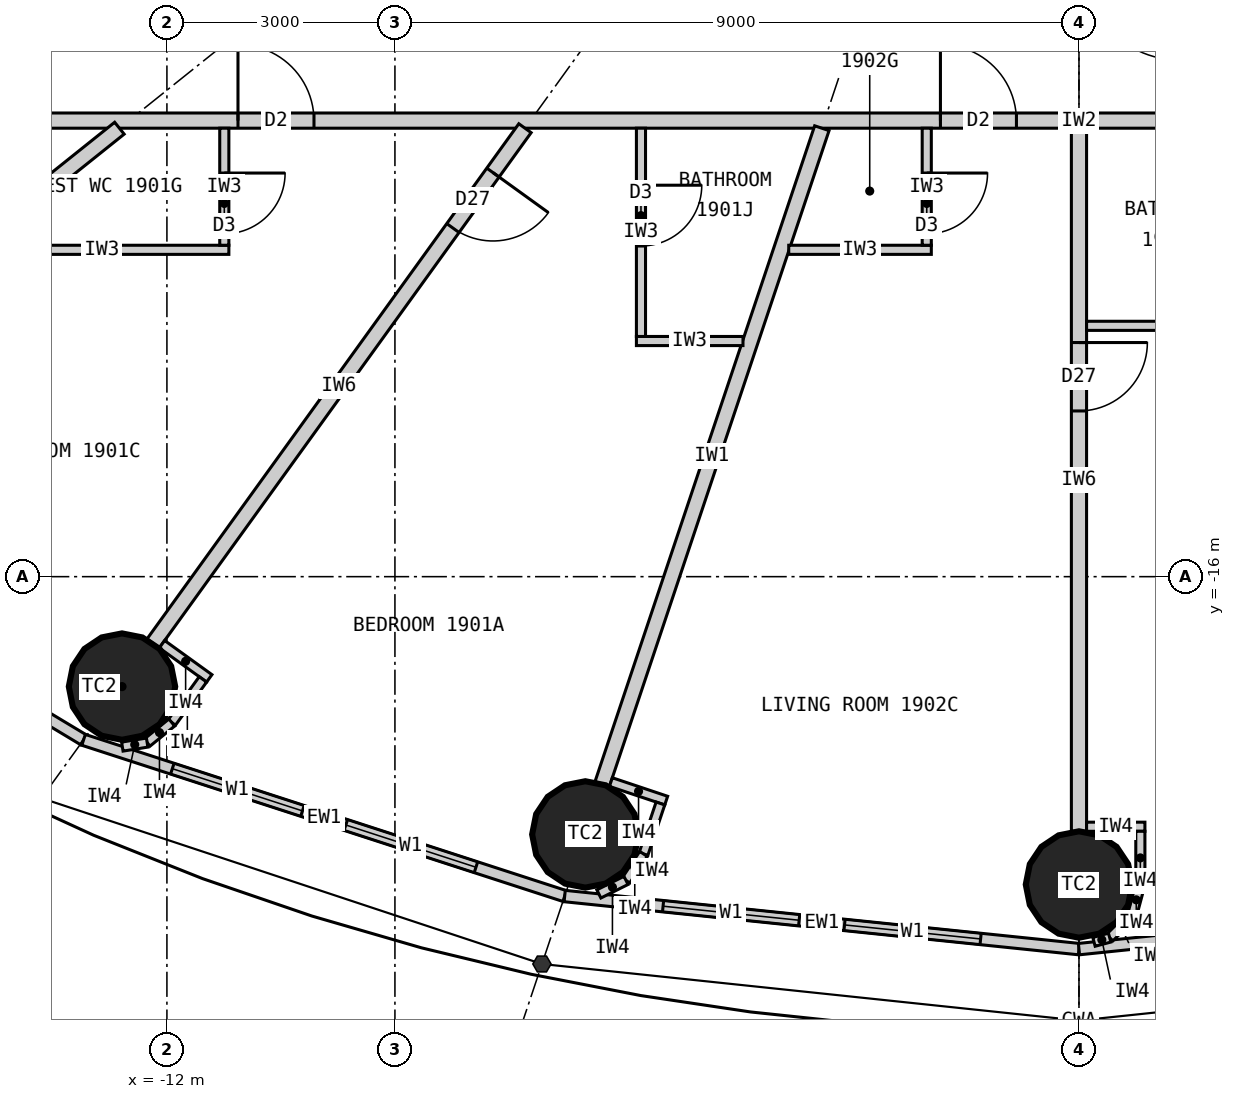
"""IFC4 building model, lengths in metres.
Left out: names, types, materials, properties, quantities, classifications, styles, units other than length and angle.
Written with IfcOpenShell. Run it as: python <this file> out.ifc"""

import sys

from ifc_helpers import new_model, si_unit, direction, frame, frame_2d, origin, origin_2d, place, context, subcontext, project, spatial, rectangle, circle, extrude, element, fill, save


model = new_model("IFC4")
c1 = context("Model", 3, precision=1e-05, world=origin(), true_north=direction((0.0, 1.0)))
c2 = subcontext(c1, "Body", "Model", "MODEL_VIEW")
j1 = project(units=[si_unit("LENGTHUNIT", "METRE"), si_unit("PLANEANGLEUNIT", "RADIAN")], contexts=[c1])
p1 = place(None, origin())
s1 = spatial("IfcSite", under=j1, at=p1, CompositionType="ELEMENT")
p2 = place(p1, origin())
s2 = spatial("IfcBuilding", under=s1, at=p2, CompositionType="ELEMENT")
p3 = place(p2, frame((0.0, 0.0, 77.1)))
s3 = spatial("IfcBuildingStorey", under=s2, at=p3, CompositionType="ELEMENT", Elevation=77.1)
for number, where, z_axis, x_axis in (
    (1, (-12.591, -17.447, 0.0), (0.0, 0.0, 1.0), (1.0, 0.0, 0.0)),
    (2, (-6.495, -19.391, 0.0), (0.0, 0.0, 1.0), (1.0, 0.0, 0.0)),
    (3, (0.0, -20.05, 0.0), (0.0, 0.0, 1.0), (1.0, 0.0, 0.0)),
):
    element("IfcColumn", number, at=place(p3, frame(where, z_axis=z_axis, x_axis=x_axis)), inside=s3, PredefinedType="COLUMN", context=c2, shape_type="SweptSolid", body=[
        extrude(circle(Radius=0.7, at=origin_2d()), origin(), (0.0, 0.0, 1.0), 3.3),
    ])
p4 = place(p3, frame((-18.57, -14.856, 0.0), z_axis=(0.0, 0.0, 1.0), x_axis=(0.856983180864, -0.515344377787, 0.0)))
e4 = element("IfcWall", 4, at=p4, inside=s3, PredefinedType="ELEMENTEDWALL", context=c2, shape_type="SweptSolid", body=[
    extrude(rectangle(XDim=6.386, YDim=0.15, at=frame_2d((3.193, 0.0))), origin(), (0.0, 0.0, 1.0), 3.12),
])
p5 = place(p4, frame((1.093, 0.0, 0.9)))
e5 = element("IfcOpeningElement", 5, at=p5, cuts=e4, PredefinedType="OPENING", context=c2, shape_type="SweptSolid", body=[
    extrude(rectangle(XDim=1.8, YDim=1.9, at=frame_2d((0.9, 0.95))), frame((0.0, 0.085, 0.0), z_axis=(0.0, -1.0, 0.0), x_axis=(1.0, 0.0, 0.0)), (0.0, 0.0, 1.0), 0.17),
])
p6 = place(p4, frame((3.493, 0.0, 0.9)))
e6 = element("IfcOpeningElement", 6, at=p6, cuts=e4, PredefinedType="OPENING", context=c2, shape_type="SweptSolid", body=[
    extrude(rectangle(XDim=1.8, YDim=1.9, at=frame_2d((0.9, 0.95))), frame((0.0, 0.085, 0.0), z_axis=(0.0, -1.0, 0.0), x_axis=(1.0, 0.0, 0.0)), (0.0, 0.0, 1.0), 0.17),
])
p7 = place(p3, frame((-13.096, -18.147, 0.0), z_axis=(0.0, 0.0, 1.0), x_axis=(0.951137534625, -0.308767534285, 0.0)))
e7 = element("IfcWall", 7, at=p7, inside=s3, PredefinedType="ELEMENTEDWALL", context=c2, shape_type="SweptSolid", body=[
    extrude(rectangle(XDim=6.655, YDim=0.15, at=frame_2d((3.328, 0.0))), origin(), (0.0, 0.0, 1.0), 3.12),
])
p8 = place(p7, frame((1.228, 0.0, 0.9)))
e8 = element("IfcOpeningElement", 8, at=p8, cuts=e7, PredefinedType="OPENING", context=c2, shape_type="SweptSolid", body=[
    extrude(rectangle(XDim=1.8, YDim=1.9, at=frame_2d((0.9, 0.95))), frame((0.0, 0.085, 0.0), z_axis=(0.0, -1.0, 0.0), x_axis=(1.0, 0.0, 0.0)), (0.0, 0.0, 1.0), 0.17),
])
p9 = place(p7, frame((3.628, 0.0, 0.9)))
e9 = element("IfcOpeningElement", 9, at=p9, cuts=e7, PredefinedType="OPENING", context=c2, shape_type="SweptSolid", body=[
    extrude(rectangle(XDim=1.8, YDim=1.9, at=frame_2d((0.9, 0.95))), frame((0.0, 0.085, 0.0), z_axis=(0.0, -1.0, 0.0), x_axis=(1.0, 0.0, 0.0)), (0.0, 0.0, 1.0), 0.17),
])
p10 = place(p3, frame((-6.766, -20.202, 0.0), z_axis=(0.0, 0.0, 1.0), x_axis=(0.994721394369, -0.102612609291, 0.0)))
e10 = element("IfcWall", 10, at=p10, inside=s3, PredefinedType="ELEMENTEDWALL", context=c2, shape_type="SweptSolid", body=[
    extrude(rectangle(XDim=6.802, YDim=0.15, at=frame_2d((3.401, 0.0))), origin(), (0.0, 0.0, 1.0), 3.12),
])
p11 = place(p10, frame((1.301, 0.0, 0.9)))
e11 = element("IfcOpeningElement", 11, at=p11, cuts=e10, PredefinedType="OPENING", context=c2, shape_type="SweptSolid", body=[
    extrude(rectangle(XDim=1.8, YDim=1.9, at=frame_2d((0.9, 0.95))), frame((0.0, 0.085, 0.0), z_axis=(0.0, -1.0, 0.0), x_axis=(1.0, 0.0, 0.0)), (0.0, 0.0, 1.0), 0.17),
])
p12 = place(p10, frame((3.701, 0.0, 0.9)))
e12 = element("IfcOpeningElement", 12, at=p12, cuts=e10, PredefinedType="OPENING", context=c2, shape_type="SweptSolid", body=[
    extrude(rectangle(XDim=1.8, YDim=1.9, at=frame_2d((0.9, 0.95))), frame((0.0, 0.085, 0.0), z_axis=(0.0, -1.0, 0.0), x_axis=(1.0, 0.0, 0.0)), (0.0, 0.0, 1.0), 0.17),
])
p13 = place(p3, frame((0.0, -20.9, 0.0), z_axis=(0.0, 0.0, 1.0), x_axis=(0.994721394369, 0.102612609291, 0.0)))
e13 = element("IfcWall", 13, at=p13, inside=s3, PredefinedType="ELEMENTEDWALL", context=c2, shape_type="SweptSolid", body=[
    extrude(rectangle(XDim=6.802, YDim=0.15, at=frame_2d((3.401, 0.0))), origin(), (0.0, 0.0, 1.0), 3.12),
])
p14 = place(p13, frame((1.301, 0.0, 0.9)))
e14 = element("IfcOpeningElement", 14, at=p14, cuts=e13, PredefinedType="OPENING", context=c2, shape_type="SweptSolid", body=[
    extrude(rectangle(XDim=1.8, YDim=1.9, at=frame_2d((0.9, 0.95))), frame((0.0, 0.085, 0.0), z_axis=(0.0, -1.0, 0.0), x_axis=(1.0, 0.0, 0.0)), (0.0, 0.0, 1.0), 0.17),
])
p15 = place(p13, frame((3.701, 0.0, 0.9)))
e15 = element("IfcOpeningElement", 15, at=p15, cuts=e13, PredefinedType="OPENING", context=c2, shape_type="SweptSolid", body=[
    extrude(rectangle(XDim=1.8, YDim=1.9, at=frame_2d((0.9, 0.95))), frame((0.0, 0.085, 0.0), z_axis=(0.0, -1.0, 0.0), x_axis=(1.0, 0.0, 0.0)), (0.0, 0.0, 1.0), 0.17),
])
p16 = place(p3, frame((14.1, -10.0, 0.0), z_axis=(0.0, 0.0, 1.0), x_axis=(-1.0, 0.0, 0.0)))
e16 = element("IfcWall", 16, at=p16, inside=s3, PredefinedType="PARTITIONING", context=c2, shape_type="SweptSolid", body=[
    extrude(rectangle(XDim=28.2, YDim=0.2, at=frame_2d((14.1, 0.0))), origin(), (0.0, 0.0, 1.0), 3.12),
])
p17 = place(p16, frame((24.165, 0.0, 0.0)))
e17 = element("IfcOpeningElement", 17, at=p17, cuts=e16, PredefinedType="OPENING", context=c2, shape_type="SweptSolid", body=[
    extrude(rectangle(XDim=1.0, YDim=2.2, at=frame_2d((0.5, 1.1))), frame((0.0, 0.11, 0.0), z_axis=(0.0, -1.0, 0.0), x_axis=(1.0, 0.0, 0.0)), (0.0, 0.0, 1.0), 0.22),
])
p18 = place(p16, frame((14.923, 0.0, 0.0)))
e18 = element("IfcOpeningElement", 18, at=p18, cuts=e16, PredefinedType="OPENING", context=c2, shape_type="SweptSolid", body=[
    extrude(rectangle(XDim=1.0, YDim=2.2, at=frame_2d((0.5, 1.1))), frame((0.0, 0.11, 0.0), z_axis=(0.0, -1.0, 0.0), x_axis=(1.0, 0.0, 0.0)), (0.0, 0.0, 1.0), 0.22),
])
p19 = place(p16, frame((3.035, 0.0, 0.0)))
e19 = element("IfcOpeningElement", 19, at=p19, cuts=e16, PredefinedType="OPENING", context=c2, shape_type="SweptSolid", body=[
    extrude(rectangle(XDim=1.0, YDim=2.2, at=frame_2d((0.5, 1.1))), frame((0.0, 0.11, 0.0), z_axis=(0.0, -1.0, 0.0), x_axis=(1.0, 0.0, 0.0)), (0.0, 0.0, 1.0), 0.22),
])
p20 = place(p3, frame((-12.625, -10.1, 0.0), z_axis=(0.0, 0.0, 1.0), x_axis=(-0.780892451574, -0.624665493744, 0.0)))
e20 = element("IfcWall", 20, at=p20, inside=s3, PredefinedType="PARTITIONING", context=c2, shape_type="SweptSolid", body=[
    extrude(rectangle(XDim=6.045, YDim=0.2, at=frame_2d((3.022, 0.0))), origin(), (0.0, 0.0, 1.0), 2.32),
])
p21 = place(p3, frame((-7.289, -10.1, 0.0), z_axis=(0.0, 0.0, 1.0), x_axis=(-0.585198353053, -0.810890182197, 0.0)))
e21 = element("IfcWall", 21, at=p21, inside=s3, PredefinedType="PARTITIONING", context=c2, shape_type="SweptSolid", body=[
    extrude(rectangle(XDim=8.36, YDim=0.2, at=frame_2d((4.18, 0.0))), origin(), (0.0, 0.0, 1.0), 2.32),
])
p22 = place(p21, frame((0.72, 0.0, 0.0)))
e22 = element("IfcOpeningElement", 22, at=p22, cuts=e21, PredefinedType="OPENING", context=c2, shape_type="SweptSolid", body=[
    extrude(rectangle(XDim=0.9, YDim=2.1, at=frame_2d((0.45, 1.05))), frame((0.0, 0.11, 0.0), z_axis=(0.0, -1.0, 0.0), x_axis=(1.0, 0.0, 0.0)), (0.0, 0.0, 1.0), 0.22),
])
p23 = place(p3, frame((-3.383, -10.1, 0.0), z_axis=(0.0, 0.0, 1.0), x_axis=(-0.31759592231, -0.948226149256, 0.0)))
e23 = element("IfcWall", 23, at=p23, inside=s3, PredefinedType="PARTITIONING", context=c2, shape_type="SweptSolid", body=[
    extrude(rectangle(XDim=9.098, YDim=0.2, at=frame_2d((4.549, 0.0))), origin(), (0.0, 0.0, 1.0), 2.32),
])
p24 = place(p3, frame((0.0, -10.1, 0.0), z_axis=(0.0, 0.0, 1.0), x_axis=(0.0, -1.0, 0.0)))
e24 = element("IfcWall", 24, at=p24, inside=s3, PredefinedType="PARTITIONING", context=c2, shape_type="SweptSolid", body=[
    extrude(rectangle(XDim=9.25, YDim=0.2, at=frame_2d((4.625, 0.0))), origin(), (0.0, 0.0, 1.0), 2.32),
])
p25 = place(p24, frame((2.82, 0.0, 0.0)))
e25 = element("IfcOpeningElement", 25, at=p25, cuts=e24, PredefinedType="OPENING", context=c2, shape_type="SweptSolid", body=[
    extrude(rectangle(XDim=0.9, YDim=2.1, at=frame_2d((0.45, 1.05))), frame((0.0, 0.11, 0.0), z_axis=(0.0, -1.0, 0.0), x_axis=(1.0, 0.0, 0.0)), (0.0, 0.0, 1.0), 0.22),
])
p26 = place(p3, frame((-14.525, -11.7, 0.0), z_axis=(0.0, 0.0, 1.0), x_axis=(1.0, 0.0, 0.0)))
e26 = element("IfcWall", 26, at=p26, inside=s3, PredefinedType="PARTITIONING", context=c2, shape_type="SweptSolid", body=[
    extrude(rectangle(XDim=3.34, YDim=0.12, at=frame_2d((1.67, 0.0))), origin(), (0.0, 0.0, 1.0), 3.12),
])
p27 = place(p3, frame((-11.245, -10.1, 0.0), z_axis=(0.0, 0.0, 1.0), x_axis=(0.0, -1.0, 0.0)))
e27 = element("IfcWall", 27, at=p27, inside=s3, PredefinedType="PARTITIONING", context=c2, shape_type="SweptSolid", body=[
    extrude(rectangle(XDim=1.54, YDim=0.12, at=frame_2d((0.77, 0.0))), origin(), (0.0, 0.0, 1.0), 3.12),
])
p28 = place(p27, frame((0.59, 0.0, 0.0)))
e28 = element("IfcOpeningElement", 28, at=p28, cuts=e27, PredefinedType="OPENING", context=c2, shape_type="SweptSolid", body=[
    extrude(rectangle(XDim=0.8, YDim=2.1, at=frame_2d((0.4, 1.05))), frame((0.0, 0.07, 0.0), z_axis=(0.0, -1.0, 0.0), x_axis=(1.0, 0.0, 0.0)), (0.0, 0.0, 1.0), 0.14),
])
p29 = place(p3, frame((-4.421, -12.9, 0.0), z_axis=(0.0, 0.0, 1.0), x_axis=(-1.0, 0.0, 0.0)))
e29 = element("IfcWall", 29, at=p29, inside=s3, PredefinedType="PARTITIONING", context=c2, shape_type="SweptSolid", body=[
    extrude(rectangle(XDim=1.402, YDim=0.12, at=frame_2d((0.701, 0.0))), origin(), (0.0, 0.0, 1.0), 3.12),
])
p30 = place(p3, frame((-5.763, -10.1, 0.0), z_axis=(0.0, 0.0, 1.0), x_axis=(0.0, -1.0, 0.0)))
e30 = element("IfcWall", 30, at=p30, inside=s3, PredefinedType="PARTITIONING", context=c2, shape_type="SweptSolid", body=[
    extrude(rectangle(XDim=2.74, YDim=0.12, at=frame_2d((1.37, 0.0))), origin(), (0.0, 0.0, 1.0), 3.12),
])
p31 = place(p30, frame((0.75, 0.0, 0.0)))
e31 = element("IfcOpeningElement", 31, at=p31, cuts=e30, PredefinedType="OPENING", context=c2, shape_type="SweptSolid", body=[
    extrude(rectangle(XDim=0.8, YDim=2.1, at=frame_2d((0.4, 1.05))), frame((0.0, 0.07, 0.0), z_axis=(0.0, -1.0, 0.0), x_axis=(1.0, 0.0, 0.0)), (0.0, 0.0, 1.0), 0.14),
])
p32 = place(p3, frame((-3.819, -11.7, 0.0), z_axis=(0.0, 0.0, 1.0), x_axis=(1.0, 0.0, 0.0)))
e32 = element("IfcWall", 32, at=p32, inside=s3, PredefinedType="PARTITIONING", context=c2, shape_type="SweptSolid", body=[
    extrude(rectangle(XDim=1.876, YDim=0.12, at=frame_2d((0.938, 0.0))), origin(), (0.0, 0.0, 1.0), 3.12),
])
p33 = place(p3, frame((-2.003, -10.1, 0.0), z_axis=(0.0, 0.0, 1.0), x_axis=(0.0, -1.0, 0.0)))
e33 = element("IfcWall", 33, at=p33, inside=s3, PredefinedType="PARTITIONING", context=c2, shape_type="SweptSolid", body=[
    extrude(rectangle(XDim=1.54, YDim=0.12, at=frame_2d((0.77, 0.0))), origin(), (0.0, 0.0, 1.0), 3.12),
])
p34 = place(p33, frame((0.59, 0.0, 0.0)))
e34 = element("IfcOpeningElement", 34, at=p34, cuts=e33, PredefinedType="OPENING", context=c2, shape_type="SweptSolid", body=[
    extrude(rectangle(XDim=0.8, YDim=2.1, at=frame_2d((0.4, 1.05))), frame((0.0, 0.07, 0.0), z_axis=(0.0, -1.0, 0.0), x_axis=(1.0, 0.0, 0.0)), (0.0, 0.0, 1.0), 0.14),
])
p35 = place(p3, frame((0.1, -12.7, 0.0), z_axis=(0.0, 0.0, 1.0), x_axis=(1.0, 0.0, 0.0)))
e35 = element("IfcWall", 35, at=p35, inside=s3, PredefinedType="PARTITIONING", context=c2, shape_type="SweptSolid", body=[
    extrude(rectangle(XDim=2.34, YDim=0.12, at=frame_2d((1.17, 0.0))), origin(), (0.0, 0.0, 1.0), 3.12),
])
p36 = place(p3, frame((-12.065, -16.889, 0.0), z_axis=(0.0, 0.0, 1.0), x_axis=(0.810821798253, -0.585293098778, 0.0)))
e36 = element("IfcWall", 36, at=p36, inside=s3, PredefinedType="PARTITIONING", context=c2, shape_type="SweptSolid", body=[
    extrude(rectangle(XDim=0.768, YDim=0.12, at=frame_2d((0.384, 0.0))), origin(), (0.0, 0.0, 1.0), 3.12),
])
p37 = place(p3, frame((-11.526, -17.351, 0.0), z_axis=(0.0, 0.0, 1.0), x_axis=(-0.585223113993, -0.810872312296, 0.0)))
e37 = element("IfcWall", 37, at=p37, inside=s3, PredefinedType="PARTITIONING", context=c2, shape_type="SweptSolid", body=[
    extrude(rectangle(XDim=0.7, YDim=0.12, at=frame_2d((0.35, 0.0))), origin(), (0.0, 0.0, 1.0), 3.12),
])
p38 = place(p3, frame((-11.936, -17.919, 0.0), z_axis=(0.0, 0.0, 1.0), x_axis=(-0.775023088441, -0.631932917629, 0.0)))
e38 = element("IfcWall", 38, at=p38, inside=s3, PredefinedType="PARTITIONING", context=c2, shape_type="SweptSolid", body=[
    extrude(rectangle(XDim=0.418, YDim=0.12, at=frame_2d((0.209, 0.0))), origin(), (0.0, 0.0, 1.0), 3.12),
])
p39 = place(p3, frame((-12.26, -18.183, 0.0), z_axis=(0.0, 0.0, 1.0), x_axis=(-0.987218661664, -0.159371622511, 0.0)))
e39 = element("IfcWall", 39, at=p39, inside=s3, PredefinedType="PARTITIONING", context=c2, shape_type="SweptSolid", body=[
    extrude(rectangle(XDim=0.331, YDim=0.12, at=frame_2d((0.166, 0.0))), origin(), (0.0, 0.0, 1.0), 3.12),
])
p40 = place(p3, frame((-6.159, -18.702, 0.0), z_axis=(0.0, 0.0, 1.0), x_axis=(0.948173154049, -0.31775410295, 0.0)))
e40 = element("IfcWall", 40, at=p40, inside=s3, PredefinedType="PARTITIONING", context=c2, shape_type="SweptSolid", body=[
    extrude(rectangle(XDim=0.768, YDim=0.12, at=frame_2d((0.384, 0.0))), origin(), (0.0, 0.0, 1.0), 3.12),
])
p41 = place(p3, frame((-5.507, -18.984, 0.0), z_axis=(0.0, 0.0, 1.0), x_axis=(-0.317692050622, -0.948193946918, 0.0)))
e41 = element("IfcWall", 41, at=p41, inside=s3, PredefinedType="PARTITIONING", context=c2, shape_type="SweptSolid", body=[
    extrude(rectangle(XDim=0.7, YDim=0.12, at=frame_2d((0.35, 0.0))), origin(), (0.0, 0.0, 1.0), 3.12),
])
p42 = place(p3, frame((-5.729, -19.648, 0.0), z_axis=(0.0, 0.0, 1.0), x_axis=(-0.552135764955, -0.833754218615, 0.0)))
e42 = element("IfcWall", 42, at=p42, inside=s3, PredefinedType="PARTITIONING", context=c2, shape_type="SweptSolid", body=[
    extrude(rectangle(XDim=0.418, YDim=0.12, at=frame_2d((0.209, 0.0))), origin(), (0.0, 0.0, 1.0), 3.12),
])
p43 = place(p3, frame((-5.96, -19.996, 0.0), z_axis=(0.0, 0.0, 1.0), x_axis=(-0.895160725913, -0.445743507842, 0.0)))
e43 = element("IfcWall", 43, at=p43, inside=s3, PredefinedType="PARTITIONING", context=c2, shape_type="SweptSolid", body=[
    extrude(rectangle(XDim=0.399, YDim=0.12, at=frame_2d((0.199, 0.0))), origin(), (0.0, 0.0, 1.0), 3.12),
])
p44 = place(p3, frame((0.1, -19.29, 0.0), z_axis=(0.0, 0.0, 1.0), x_axis=(1.0, 0.0, 0.0)))
e44 = element("IfcWall", 44, at=p44, inside=s3, PredefinedType="PARTITIONING", context=c2, shape_type="SweptSolid", body=[
    extrude(rectangle(XDim=0.767, YDim=0.12, at=frame_2d((0.384, 0.0))), origin(), (0.0, 0.0, 1.0), 3.12),
])
p45 = place(p3, frame((0.808, -19.35, 0.0), z_axis=(0.0, 0.0, 1.0), x_axis=(0.0, -1.0, 0.0)))
e45 = element("IfcWall", 45, at=p45, inside=s3, PredefinedType="PARTITIONING", context=c2, shape_type="SweptSolid", body=[
    extrude(rectangle(XDim=0.7, YDim=0.12, at=frame_2d((0.35, 0.0))), origin(), (0.0, 0.0, 1.0), 3.12),
])
p46 = place(p3, frame((0.808, -20.05, 0.0), z_axis=(0.0, 0.0, 1.0), x_axis=(-0.2592614205, -0.965807183573, 0.0)))
e46 = element("IfcWall", 46, at=p46, inside=s3, PredefinedType="PARTITIONING", context=c2, shape_type="SweptSolid", body=[
    extrude(rectangle(XDim=0.418, YDim=0.12, at=frame_2d((0.209, 0.0))), origin(), (0.0, 0.0, 1.0), 3.12),
])
p47 = place(p3, frame((0.699, -20.454, 0.0), z_axis=(0.0, 0.0, 1.0), x_axis=(-0.707106781187, -0.707106781187, 0.0)))
e47 = element("IfcWall", 47, at=p47, inside=s3, PredefinedType="PARTITIONING", context=c2, shape_type="SweptSolid", body=[
    extrude(rectangle(XDim=0.418, YDim=0.12, at=frame_2d((0.209, 0.0))), origin(), (0.0, 0.0, 1.0), 3.12),
])
p48 = place(p3, frame((0.404, -20.749, 0.0), z_axis=(0.0, 0.0, 1.0), x_axis=(-0.965759066438, -0.25944060128, 0.0)))
e48 = element("IfcWall", 48, at=p48, inside=s3, PredefinedType="PARTITIONING", context=c2, shape_type="SweptSolid", body=[
    extrude(rectangle(XDim=0.214, YDim=0.12, at=frame_2d((0.107, 0.0))), origin(), (0.0, 0.0, 1.0), 3.12),
])
p49 = place(p8, origin())
e49 = element("IfcWindow", 49, at=p49, inside=s3, PartitioningType="SINGLE_PANEL", PredefinedType="WINDOW", context=c2, shape_type="SweptSolid", body=[
    extrude(rectangle(XDim=1.8, YDim=1.9, at=frame_2d((0.9, 0.95))), frame((0.0, 0.03, 0.0), z_axis=(0.0, -1.0, 0.0), x_axis=(1.0, 0.0, 0.0)), (0.0, 0.0, 1.0), 0.06),
])
fill(e8, e49)
p50 = place(p9, origin())
e50 = element("IfcWindow", 50, at=p50, inside=s3, PartitioningType="SINGLE_PANEL", PredefinedType="WINDOW", context=c2, shape_type="SweptSolid", body=[
    extrude(rectangle(XDim=1.8, YDim=1.9, at=frame_2d((0.9, 0.95))), frame((0.0, 0.03, 0.0), z_axis=(0.0, -1.0, 0.0), x_axis=(1.0, 0.0, 0.0)), (0.0, 0.0, 1.0), 0.06),
])
fill(e9, e50)
p51 = place(p11, origin())
e51 = element("IfcWindow", 51, at=p51, inside=s3, PartitioningType="SINGLE_PANEL", PredefinedType="WINDOW", context=c2, shape_type="SweptSolid", body=[
    extrude(rectangle(XDim=1.8, YDim=1.9, at=frame_2d((0.9, 0.95))), frame((0.0, 0.03, 0.0), z_axis=(0.0, -1.0, 0.0), x_axis=(1.0, 0.0, 0.0)), (0.0, 0.0, 1.0), 0.06),
])
fill(e11, e51)
p52 = place(p12, origin())
e52 = element("IfcWindow", 52, at=p52, inside=s3, PartitioningType="SINGLE_PANEL", PredefinedType="WINDOW", context=c2, shape_type="SweptSolid", body=[
    extrude(rectangle(XDim=1.8, YDim=1.9, at=frame_2d((0.9, 0.95))), frame((0.0, 0.03, 0.0), z_axis=(0.0, -1.0, 0.0), x_axis=(1.0, 0.0, 0.0)), (0.0, 0.0, 1.0), 0.06),
])
fill(e12, e52)
p53 = place(p28, origin())
e53 = element("IfcDoor", 53, at=p53, inside=s3, OperationType="SINGLE_SWING_LEFT", PredefinedType="DOOR", context=c2, shape_type="SweptSolid", body=[
    extrude(rectangle(XDim=0.8, YDim=2.1, at=frame_2d((0.4, 1.05))), frame((0.0, 0.025, 0.0), z_axis=(0.0, -1.0, 0.0), x_axis=(1.0, 0.0, 0.0)), (0.0, 0.0, 1.0), 0.05),
])
fill(e28, e53)
p54 = place(p17, origin())
e54 = element("IfcDoor", 54, at=p54, inside=s3, OperationType="SINGLE_SWING_RIGHT", PredefinedType="DOOR", context=c2, shape_type="SweptSolid", body=[
    extrude(rectangle(XDim=1.0, YDim=2.2, at=frame_2d((0.5, 1.1))), frame((0.0, 0.025, 0.0), z_axis=(0.0, -1.0, 0.0), x_axis=(1.0, 0.0, 0.0)), (0.0, 0.0, 1.0), 0.05),
])
fill(e17, e54)
p55 = place(p31, origin())
e55 = element("IfcDoor", 55, at=p55, inside=s3, OperationType="SINGLE_SWING_LEFT", PredefinedType="DOOR", context=c2, shape_type="SweptSolid", body=[
    extrude(rectangle(XDim=0.8, YDim=2.1, at=frame_2d((0.4, 1.05))), frame((0.0, 0.025, 0.0), z_axis=(0.0, -1.0, 0.0), x_axis=(1.0, 0.0, 0.0)), (0.0, 0.0, 1.0), 0.05),
])
fill(e31, e55)
p56 = place(p22, origin())
e56 = element("IfcDoor", 56, at=p56, inside=s3, OperationType="SINGLE_SWING_LEFT", PredefinedType="DOOR", context=c2, shape_type="SweptSolid", body=[
    extrude(rectangle(XDim=0.9, YDim=2.1, at=frame_2d((0.45, 1.05))), frame((0.0, 0.025, 0.0), z_axis=(0.0, -1.0, 0.0), x_axis=(1.0, 0.0, 0.0)), (0.0, 0.0, 1.0), 0.05),
])
fill(e22, e56)
p57 = place(p34, origin())
e57 = element("IfcDoor", 57, at=p57, inside=s3, OperationType="SINGLE_SWING_LEFT", PredefinedType="DOOR", context=c2, shape_type="SweptSolid", body=[
    extrude(rectangle(XDim=0.8, YDim=2.1, at=frame_2d((0.4, 1.05))), frame((0.0, 0.025, 0.0), z_axis=(0.0, -1.0, 0.0), x_axis=(1.0, 0.0, 0.0)), (0.0, 0.0, 1.0), 0.05),
])
fill(e34, e57)
p58 = place(p18, origin())
e58 = element("IfcDoor", 58, at=p58, inside=s3, OperationType="SINGLE_SWING_RIGHT", PredefinedType="DOOR", context=c2, shape_type="SweptSolid", body=[
    extrude(rectangle(XDim=1.0, YDim=2.2, at=frame_2d((0.5, 1.1))), frame((0.0, 0.025, 0.0), z_axis=(0.0, -1.0, 0.0), x_axis=(1.0, 0.0, 0.0)), (0.0, 0.0, 1.0), 0.05),
])
fill(e18, e58)
p59 = place(p25, origin())
e59 = element("IfcDoor", 59, at=p59, inside=s3, OperationType="SINGLE_SWING_LEFT", PredefinedType="DOOR", context=c2, shape_type="SweptSolid", body=[
    extrude(rectangle(XDim=0.9, YDim=2.1, at=frame_2d((0.45, 1.05))), frame((0.0, 0.025, 0.0), z_axis=(0.0, -1.0, 0.0), x_axis=(1.0, 0.0, 0.0)), (0.0, 0.0, 1.0), 0.05),
])
fill(e25, e59)
save(model, sys.argv[1])
